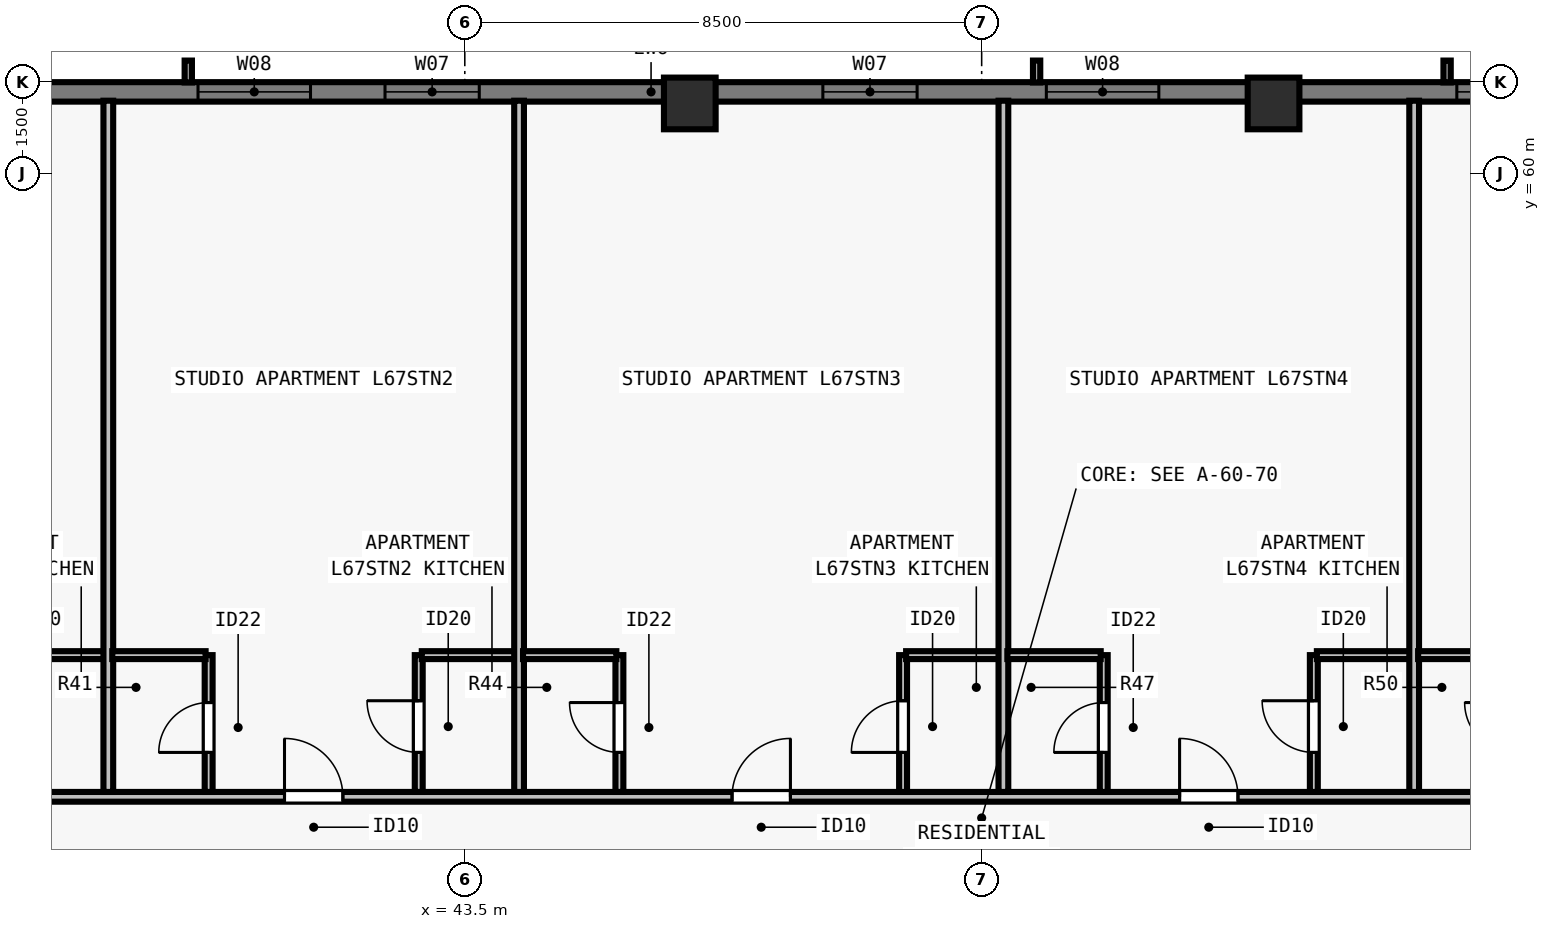
"""IFC4 building model, lengths in metres.
Left out: names, types, materials, properties, quantities, classifications, styles, units other than length and angle.
Written with IfcOpenShell. Run it as: python <this file> out.ifc"""

import sys

from ifc_helpers import new_model, si_unit, direction, frame, frame_2d, origin, origin_2d, place, context, subcontext, project, spatial, rectangle, extrude, element, fill, save


model = new_model("IFC4")
c1 = context("Model", 3, precision=1e-05, world=origin(), true_north=direction((0.0, 1.0)))
c2 = subcontext(c1, "Body", "Model", "MODEL_VIEW")
j1 = project(units=[si_unit("LENGTHUNIT", "METRE"), si_unit("PLANEANGLEUNIT", "RADIAN")], contexts=[c1])
p1 = place(None, origin())
s1 = spatial("IfcSite", under=j1, at=p1, CompositionType="ELEMENT")
p2 = place(p1, origin())
s2 = spatial("IfcBuilding", under=s1, at=p2, CompositionType="ELEMENT")
p3 = place(p2, frame((0.0, 0.0, 244.5)))
s3 = spatial("IfcBuildingStorey", under=s2, at=p3, CompositionType="ELEMENT", Elevation=244.5)
for number, where, z_axis, x_axis in (
    (1, (56.8, 61.15, 0.0), (0.0, 0.0, 1.0), (1.0, 0.0, 0.0)),
    (2, (47.2, 61.15, 0.0), (0.0, 0.0, 1.0), (1.0, 0.0, 0.0)),
):
    element("IfcColumn", number, at=place(p3, frame(where, z_axis=z_axis, x_axis=x_axis)), inside=s3, PredefinedType="COLUMN", context=c2, shape_type="SweptSolid", body=[
        extrude(rectangle(XDim=0.85, YDim=0.85, at=origin_2d()), origin(), (0.0, 0.0, 1.0), 3.5),
    ])
p4 = place(p3, frame((34.5, 61.34, 0.0), z_axis=(0.0, 0.0, 1.0), x_axis=(1.0, 0.0, 0.0)))
e3 = element("IfcWall", 3, at=p4, inside=s3, PredefinedType="SOLIDWALL", context=c2, shape_type="SweptSolid", body=[
    extrude(rectangle(XDim=34.702, YDim=0.32, at=frame_2d((17.351, 0.0))), origin(), (0.0, 0.0, 1.0), 3.29),
])
p5 = place(p4, frame((4.613, 0.0, 0.8)))
e4 = element("IfcOpeningElement", 4, at=p5, cuts=e3, PredefinedType="OPENING", context=c2, shape_type="SweptSolid", body=[
    extrude(rectangle(XDim=1.85, YDim=1.678, at=frame_2d((0.925, 0.839))), frame((0.0, 0.17, 0.0), z_axis=(0.0, -1.0, 0.0), x_axis=(1.0, 0.0, 0.0)), (0.0, 0.0, 1.0), 0.34),
])
p6 = place(p4, frame((7.688, 0.0, 0.8)))
e5 = element("IfcOpeningElement", 5, at=p6, cuts=e3, PredefinedType="OPENING", context=c2, shape_type="SweptSolid", body=[
    extrude(rectangle(XDim=1.55, YDim=1.678, at=frame_2d((0.775, 0.839))), frame((0.0, 0.17, 0.0), z_axis=(0.0, -1.0, 0.0), x_axis=(1.0, 0.0, 0.0)), (0.0, 0.0, 1.0), 0.34),
])
p7 = place(p4, frame((14.888, 0.0, 0.8)))
e6 = element("IfcOpeningElement", 6, at=p7, cuts=e3, PredefinedType="OPENING", context=c2, shape_type="SweptSolid", body=[
    extrude(rectangle(XDim=1.55, YDim=1.678, at=frame_2d((0.775, 0.839))), frame((0.0, 0.17, 0.0), z_axis=(0.0, -1.0, 0.0), x_axis=(1.0, 0.0, 0.0)), (0.0, 0.0, 1.0), 0.34),
])
p8 = place(p4, frame((18.564, 0.0, 0.8)))
e7 = element("IfcOpeningElement", 7, at=p8, cuts=e3, PredefinedType="OPENING", context=c2, shape_type="SweptSolid", body=[
    extrude(rectangle(XDim=1.85, YDim=1.678, at=frame_2d((0.925, 0.839))), frame((0.0, 0.17, 0.0), z_axis=(0.0, -1.0, 0.0), x_axis=(1.0, 0.0, 0.0)), (0.0, 0.0, 1.0), 0.34),
])
p9 = place(p4, frame((25.314, 0.0, 0.8)))
e8 = element("IfcOpeningElement", 8, at=p9, cuts=e3, PredefinedType="OPENING", context=c2, shape_type="SweptSolid", body=[
    extrude(rectangle(XDim=1.85, YDim=1.678, at=frame_2d((0.925, 0.839))), frame((0.0, 0.17, 0.0), z_axis=(0.0, -1.0, 0.0), x_axis=(1.0, 0.0, 0.0)), (0.0, 0.0, 1.0), 0.34),
])
p10 = place(p4, frame((28.389, 0.0, 0.8)))
e9 = element("IfcOpeningElement", 9, at=p10, cuts=e3, PredefinedType="OPENING", context=c2, shape_type="SweptSolid", body=[
    extrude(rectangle(XDim=1.55, YDim=1.678, at=frame_2d((0.775, 0.839))), frame((0.0, 0.17, 0.0), z_axis=(0.0, -1.0, 0.0), x_axis=(1.0, 0.0, 0.0)), (0.0, 0.0, 1.0), 0.34),
])
p11 = place(p3, frame((29.805, 49.748, 0.0), z_axis=(0.0, 0.0, 1.0), x_axis=(1.0, 0.0, 0.0)))
e10 = element("IfcWall", 10, at=p11, inside=s3, PredefinedType="PARTITIONING", context=c2, shape_type="SweptSolid", body=[
    extrude(rectangle(XDim=44.39, YDim=0.16, at=frame_2d((22.195, 0.0))), origin(), (0.0, 0.0, 1.0), 2.958),
])
p12 = place(p11, frame((3.494, 0.0, 0.0)))
e11 = element("IfcOpeningElement", 11, at=p12, cuts=e10, PredefinedType="OPENING", context=c2, shape_type="SweptSolid", body=[
    extrude(rectangle(XDim=0.96, YDim=2.18, at=frame_2d((0.48, 1.09))), frame((0.0, 0.09, 0.0), z_axis=(0.0, -1.0, 0.0), x_axis=(1.0, 0.0, 0.0)), (0.0, 0.0, 1.0), 0.18),
])
p13 = place(p11, frame((10.73, 0.0, 0.0)))
e12 = element("IfcOpeningElement", 12, at=p13, cuts=e10, PredefinedType="OPENING", context=c2, shape_type="SweptSolid", body=[
    extrude(rectangle(XDim=0.96, YDim=2.18, at=frame_2d((0.48, 1.09))), frame((0.0, 0.09, 0.0), z_axis=(0.0, -1.0, 0.0), x_axis=(1.0, 0.0, 0.0)), (0.0, 0.0, 1.0), 0.18),
])
p14 = place(p11, frame((18.09, 0.0, 0.0)))
e13 = element("IfcOpeningElement", 13, at=p14, cuts=e10, PredefinedType="OPENING", context=c2, shape_type="SweptSolid", body=[
    extrude(rectangle(XDim=0.96, YDim=2.18, at=frame_2d((0.48, 1.09))), frame((0.0, 0.09, 0.0), z_axis=(0.0, -1.0, 0.0), x_axis=(1.0, 0.0, 0.0)), (0.0, 0.0, 1.0), 0.18),
])
p15 = place(p11, frame((25.45, 0.0, 0.0)))
e14 = element("IfcOpeningElement", 14, at=p15, cuts=e10, PredefinedType="OPENING", context=c2, shape_type="SweptSolid", body=[
    extrude(rectangle(XDim=0.96, YDim=2.18, at=frame_2d((0.48, 1.09))), frame((0.0, 0.09, 0.0), z_axis=(0.0, -1.0, 0.0), x_axis=(1.0, 0.0, 0.0)), (0.0, 0.0, 1.0), 0.18),
])
p16 = place(p11, frame((32.81, 0.0, 0.0)))
e15 = element("IfcOpeningElement", 15, at=p16, cuts=e10, PredefinedType="OPENING", context=c2, shape_type="SweptSolid", body=[
    extrude(rectangle(XDim=0.96, YDim=2.18, at=frame_2d((0.48, 1.09))), frame((0.0, 0.09, 0.0), z_axis=(0.0, -1.0, 0.0), x_axis=(1.0, 0.0, 0.0)), (0.0, 0.0, 1.0), 0.18),
])
p17 = place(p11, frame((40.294, 0.0, 0.0)))
e16 = element("IfcOpeningElement", 16, at=p17, cuts=e10, PredefinedType="OPENING", context=c2, shape_type="SweptSolid", body=[
    extrude(rectangle(XDim=0.96, YDim=2.18, at=frame_2d((0.48, 1.09))), frame((0.0, 0.09, 0.0), z_axis=(0.0, -1.0, 0.0), x_axis=(1.0, 0.0, 0.0)), (0.0, 0.0, 1.0), 0.18),
])
p18 = place(p3, frame((36.038, 52.077, 0.0), z_axis=(0.0, 0.0, 1.0), x_axis=(1.0, 0.0, 0.0)))
e17 = element("IfcWall", 17, at=p18, inside=s3, PredefinedType="PLUMBINGWALL", context=c2, shape_type="SweptSolid", body=[
    extrude(rectangle(XDim=1.6, YDim=0.13, at=frame_2d((0.8, 0.0))), origin(), (0.0, 0.0, 1.0), 2.958),
])
p19 = place(p3, frame((37.637, 49.827, 0.0), z_axis=(0.0, 0.0, 1.0), x_axis=(0.0, 1.0, 0.0)))
e18 = element("IfcWall", 18, at=p19, inside=s3, PredefinedType="PARTITIONING", context=c2, shape_type="SweptSolid", body=[
    extrude(rectangle(XDim=11.368, YDim=0.16, at=frame_2d((5.684, 0.0))), origin(), (0.0, 0.0, 1.0), 2.573),
])
p20 = place(p3, frame((39.288, 49.827, 0.0), z_axis=(0.0, 0.0, 1.0), x_axis=(0.0, 1.0, 0.0)))
e19 = element("IfcWall", 19, at=p20, inside=s3, PredefinedType="PLUMBINGWALL", context=c2, shape_type="SweptSolid", body=[
    extrude(rectangle(XDim=2.25, YDim=0.13, at=frame_2d((1.125, 0.0))), origin(), (0.0, 0.0, 1.0), 3.29),
])
p21 = place(p20, frame((0.65, 0.0, 0.0)))
e20 = element("IfcOpeningElement", 20, at=p21, cuts=e19, PredefinedType="OPENING", context=c2, shape_type="SweptSolid", body=[
    extrude(rectangle(XDim=0.82, YDim=2.1, at=frame_2d((0.41, 1.05))), frame((0.0, 0.075, 0.0), z_axis=(0.0, -1.0, 0.0), x_axis=(1.0, 0.0, 0.0)), (0.0, 0.0, 1.0), 0.15),
])
p22 = place(p3, frame((37.702, 52.077, 0.0), z_axis=(0.0, 0.0, 1.0), x_axis=(1.0, 0.0, 0.0)))
e21 = element("IfcWall", 21, at=p22, inside=s3, PredefinedType="PLUMBINGWALL", context=c2, shape_type="SweptSolid", body=[
    extrude(rectangle(XDim=1.535, YDim=0.13, at=frame_2d((0.768, 0.0))), origin(), (0.0, 0.0, 1.0), 3.29),
])
p23 = place(p3, frame((42.742, 49.827, 0.0), z_axis=(0.0, 0.0, 1.0), x_axis=(0.0, 1.0, 0.0)))
e22 = element("IfcWall", 22, at=p23, inside=s3, PredefinedType="PLUMBINGWALL", context=c2, shape_type="SweptSolid", body=[
    extrude(rectangle(XDim=2.25, YDim=0.13, at=frame_2d((1.125, 0.0))), origin(), (0.0, 0.0, 1.0), 3.29),
])
p24 = place(p23, frame((0.65, 0.0, 0.0)))
e23 = element("IfcOpeningElement", 23, at=p24, cuts=e22, PredefinedType="OPENING", context=c2, shape_type="SweptSolid", body=[
    extrude(rectangle(XDim=0.85, YDim=2.1, at=frame_2d((0.425, 1.05))), frame((0.0, 0.075, 0.0), z_axis=(0.0, -1.0, 0.0), x_axis=(1.0, 0.0, 0.0)), (0.0, 0.0, 1.0), 0.15),
])
p25 = place(p3, frame((42.792, 52.077, 0.0), z_axis=(0.0, 0.0, 1.0), x_axis=(1.0, 0.0, 0.0)))
e24 = element("IfcWall", 24, at=p25, inside=s3, PredefinedType="PLUMBINGWALL", context=c2, shape_type="SweptSolid", body=[
    extrude(rectangle(XDim=1.6, YDim=0.13, at=frame_2d((0.8, 0.0))), origin(), (0.0, 0.0, 1.0), 3.29),
])
p26 = place(p3, frame((44.393, 49.827, 0.0), z_axis=(0.0, 0.0, 1.0), x_axis=(0.0, 1.0, 0.0)))
e25 = element("IfcWall", 25, at=p26, inside=s3, PredefinedType="PARTITIONING", context=c2, shape_type="SweptSolid", body=[
    extrude(rectangle(XDim=11.368, YDim=0.16, at=frame_2d((5.684, 0.0))), origin(), (0.0, 0.0, 1.0), 3.29),
])
p27 = place(p3, frame((46.042, 49.827, 0.0), z_axis=(0.0, 0.0, 1.0), x_axis=(0.0, 1.0, 0.0)))
e26 = element("IfcWall", 26, at=p27, inside=s3, PredefinedType="PLUMBINGWALL", context=c2, shape_type="SweptSolid", body=[
    extrude(rectangle(XDim=2.25, YDim=0.13, at=frame_2d((1.125, 0.0))), origin(), (0.0, 0.0, 1.0), 3.29),
])
p28 = place(p27, frame((0.65, 0.0, 0.0)))
e27 = element("IfcOpeningElement", 27, at=p28, cuts=e26, PredefinedType="OPENING", context=c2, shape_type="SweptSolid", body=[
    extrude(rectangle(XDim=0.82, YDim=2.1, at=frame_2d((0.41, 1.05))), frame((0.0, 0.075, 0.0), z_axis=(0.0, -1.0, 0.0), x_axis=(1.0, 0.0, 0.0)), (0.0, 0.0, 1.0), 0.15),
])
p29 = place(p3, frame((44.458, 52.077, 0.0), z_axis=(0.0, 0.0, 1.0), x_axis=(1.0, 0.0, 0.0)))
e28 = element("IfcWall", 28, at=p29, inside=s3, PredefinedType="PLUMBINGWALL", context=c2, shape_type="SweptSolid", body=[
    extrude(rectangle(XDim=1.535, YDim=0.13, at=frame_2d((0.768, 0.0))), origin(), (0.0, 0.0, 1.0), 3.29),
])
p30 = place(p3, frame((50.708, 49.827, 0.0), z_axis=(0.0, 0.0, 1.0), x_axis=(0.0, 1.0, 0.0)))
e29 = element("IfcWall", 29, at=p30, inside=s3, PredefinedType="PLUMBINGWALL", context=c2, shape_type="SweptSolid", body=[
    extrude(rectangle(XDim=2.25, YDim=0.13, at=frame_2d((1.125, 0.0))), origin(), (0.0, 0.0, 1.0), 3.29),
])
p31 = place(p30, frame((0.65, 0.0, 0.0)))
e30 = element("IfcOpeningElement", 30, at=p31, cuts=e29, PredefinedType="OPENING", context=c2, shape_type="SweptSolid", body=[
    extrude(rectangle(XDim=0.85, YDim=2.1, at=frame_2d((0.425, 1.05))), frame((0.0, 0.075, 0.0), z_axis=(0.0, -1.0, 0.0), x_axis=(1.0, 0.0, 0.0)), (0.0, 0.0, 1.0), 0.15),
])
p32 = place(p3, frame((50.758, 52.077, 0.0), z_axis=(0.0, 0.0, 1.0), x_axis=(1.0, 0.0, 0.0)))
e31 = element("IfcWall", 31, at=p32, inside=s3, PredefinedType="PLUMBINGWALL", context=c2, shape_type="SweptSolid", body=[
    extrude(rectangle(XDim=1.6, YDim=0.13, at=frame_2d((0.8, 0.0))), origin(), (0.0, 0.0, 1.0), 3.29),
])
p33 = place(p3, frame((52.357, 49.827, 0.0), z_axis=(0.0, 0.0, 1.0), x_axis=(0.0, 1.0, 0.0)))
e32 = element("IfcWall", 32, at=p33, inside=s3, PredefinedType="PARTITIONING", context=c2, shape_type="SweptSolid", body=[
    extrude(rectangle(XDim=11.368, YDim=0.16, at=frame_2d((5.684, 0.0))), origin(), (0.0, 0.0, 1.0), 2.958),
])
p34 = place(p3, frame((54.008, 49.827, 0.0), z_axis=(0.0, 0.0, 1.0), x_axis=(0.0, 1.0, 0.0)))
e33 = element("IfcWall", 33, at=p34, inside=s3, PredefinedType="PLUMBINGWALL", context=c2, shape_type="SweptSolid", body=[
    extrude(rectangle(XDim=2.25, YDim=0.13, at=frame_2d((1.125, 0.0))), origin(), (0.0, 0.0, 1.0), 3.29),
])
p35 = place(p34, frame((0.65, 0.0, 0.0)))
e34 = element("IfcOpeningElement", 34, at=p35, cuts=e33, PredefinedType="OPENING", context=c2, shape_type="SweptSolid", body=[
    extrude(rectangle(XDim=0.82, YDim=2.1, at=frame_2d((0.41, 1.05))), frame((0.0, 0.075, 0.0), z_axis=(0.0, -1.0, 0.0), x_axis=(1.0, 0.0, 0.0)), (0.0, 0.0, 1.0), 0.15),
])
p36 = place(p3, frame((52.423, 52.077, 0.0), z_axis=(0.0, 0.0, 1.0), x_axis=(1.0, 0.0, 0.0)))
e35 = element("IfcWall", 35, at=p36, inside=s3, PredefinedType="PLUMBINGWALL", context=c2, shape_type="SweptSolid", body=[
    extrude(rectangle(XDim=1.535, YDim=0.13, at=frame_2d((0.768, 0.0))), origin(), (0.0, 0.0, 1.0), 3.29),
])
p37 = place(p3, frame((57.462, 49.827, 0.0), z_axis=(0.0, 0.0, 1.0), x_axis=(0.0, 1.0, 0.0)))
e36 = element("IfcWall", 36, at=p37, inside=s3, PredefinedType="PLUMBINGWALL", context=c2, shape_type="SweptSolid", body=[
    extrude(rectangle(XDim=2.25, YDim=0.13, at=frame_2d((1.125, 0.0))), origin(), (0.0, 0.0, 1.0), 3.29),
])
p38 = place(p37, frame((0.65, 0.0, 0.0)))
e37 = element("IfcOpeningElement", 37, at=p38, cuts=e36, PredefinedType="OPENING", context=c2, shape_type="SweptSolid", body=[
    extrude(rectangle(XDim=0.85, YDim=2.1, at=frame_2d((0.425, 1.05))), frame((0.0, 0.075, 0.0), z_axis=(0.0, -1.0, 0.0), x_axis=(1.0, 0.0, 0.0)), (0.0, 0.0, 1.0), 0.15),
])
p39 = place(p3, frame((57.512, 52.077, 0.0), z_axis=(0.0, 0.0, 1.0), x_axis=(1.0, 0.0, 0.0)))
e38 = element("IfcWall", 38, at=p39, inside=s3, PredefinedType="PLUMBINGWALL", context=c2, shape_type="SweptSolid", body=[
    extrude(rectangle(XDim=1.6, YDim=0.13, at=frame_2d((0.8, 0.0))), origin(), (0.0, 0.0, 1.0), 3.29),
])
p40 = place(p3, frame((59.113, 49.827, 0.0), z_axis=(0.0, 0.0, 1.0), x_axis=(0.0, 1.0, 0.0)))
e39 = element("IfcWall", 39, at=p40, inside=s3, PredefinedType="PARTITIONING", context=c2, shape_type="SweptSolid", body=[
    extrude(rectangle(XDim=11.368, YDim=0.16, at=frame_2d((5.684, 0.0))), origin(), (0.0, 0.0, 1.0), 3.29),
])
p41 = place(p3, frame((59.177, 52.077, 0.0), z_axis=(0.0, 0.0, 1.0), x_axis=(1.0, 0.0, 0.0)))
e40 = element("IfcWall", 40, at=p41, inside=s3, PredefinedType="PLUMBINGWALL", context=c2, shape_type="SweptSolid", body=[
    extrude(rectangle(XDim=1.535, YDim=0.13, at=frame_2d((0.768, 0.0))), origin(), (0.0, 0.0, 1.0), 3.29),
])
p42 = place(p5, origin())
e41 = element("IfcWindow", 41, at=p42, inside=s3, PartitioningType="SINGLE_PANEL", PredefinedType="WINDOW", context=c2, shape_type="SweptSolid", body=[
    extrude(rectangle(XDim=1.85, YDim=1.678, at=frame_2d((0.925, 0.839))), frame((0.0, -0.05, 0.0), z_axis=(0.0, -1.0, 0.0), x_axis=(1.0, 0.0, 0.0)), (0.0, 0.0, 1.0), 0.06),
])
fill(e4, e41)
p43 = place(p6, origin())
e42 = element("IfcWindow", 42, at=p43, inside=s3, PartitioningType="SINGLE_PANEL", PredefinedType="WINDOW", context=c2, shape_type="SweptSolid", body=[
    extrude(rectangle(XDim=1.55, YDim=1.678, at=frame_2d((0.775, 0.839))), frame((0.0, -0.05, 0.0), z_axis=(0.0, -1.0, 0.0), x_axis=(1.0, 0.0, 0.0)), (0.0, 0.0, 1.0), 0.06),
])
fill(e5, e42)
p44 = place(p7, origin())
e43 = element("IfcWindow", 43, at=p44, inside=s3, PartitioningType="SINGLE_PANEL", PredefinedType="WINDOW", context=c2, shape_type="SweptSolid", body=[
    extrude(rectangle(XDim=1.55, YDim=1.678, at=frame_2d((0.775, 0.839))), frame((0.0, -0.05, 0.0), z_axis=(0.0, -1.0, 0.0), x_axis=(1.0, 0.0, 0.0)), (0.0, 0.0, 1.0), 0.06),
])
fill(e6, e43)
p45 = place(p8, origin())
e44 = element("IfcWindow", 44, at=p45, inside=s3, PartitioningType="SINGLE_PANEL", PredefinedType="WINDOW", context=c2, shape_type="SweptSolid", body=[
    extrude(rectangle(XDim=1.85, YDim=1.678, at=frame_2d((0.925, 0.839))), frame((0.0, -0.05, 0.0), z_axis=(0.0, -1.0, 0.0), x_axis=(1.0, 0.0, 0.0)), (0.0, 0.0, 1.0), 0.06),
])
fill(e7, e44)
p46 = place(p9, origin())
e45 = element("IfcWindow", 45, at=p46, inside=s3, PartitioningType="SINGLE_PANEL", PredefinedType="WINDOW", context=c2, shape_type="SweptSolid", body=[
    extrude(rectangle(XDim=1.85, YDim=1.678, at=frame_2d((0.925, 0.839))), frame((0.0, -0.05, 0.0), z_axis=(0.0, -1.0, 0.0), x_axis=(1.0, 0.0, 0.0)), (0.0, 0.0, 1.0), 0.06),
])
fill(e8, e45)
p47 = place(p21, origin())
e46 = element("IfcDoor", 46, at=p47, inside=s3, OperationType="SINGLE_SWING_LEFT", PredefinedType="DOOR", context=c2, shape_type="SweptSolid", body=[
    extrude(rectangle(XDim=0.82, YDim=2.1, at=frame_2d((0.41, 1.05))), frame((0.0, 0.025, 0.0), z_axis=(0.0, -1.0, 0.0), x_axis=(1.0, 0.0, 0.0)), (0.0, 0.0, 1.0), 0.05),
])
fill(e20, e46)
p48 = place(p24, origin())
e47 = element("IfcDoor", 47, at=p48, inside=s3, OperationType="SINGLE_SWING_RIGHT", PredefinedType="DOOR", context=c2, shape_type="SweptSolid", body=[
    extrude(rectangle(XDim=0.85, YDim=2.1, at=frame_2d((0.425, 1.05))), frame((0.0, 0.025, 0.0), z_axis=(0.0, -1.0, 0.0), x_axis=(1.0, 0.0, 0.0)), (0.0, 0.0, 1.0), 0.05),
])
fill(e23, e47)
p49 = place(p13, origin())
e48 = element("IfcDoor", 48, at=p49, inside=s3, OperationType="SINGLE_SWING_LEFT", PredefinedType="DOOR", context=c2, shape_type="SweptSolid", body=[
    extrude(rectangle(XDim=0.96, YDim=2.18, at=frame_2d((0.48, 1.09))), frame((0.0, 0.025, 0.0), z_axis=(0.0, -1.0, 0.0), x_axis=(1.0, 0.0, 0.0)), (0.0, 0.0, 1.0), 0.05),
])
fill(e12, e48)
p50 = place(p28, origin())
e49 = element("IfcDoor", 49, at=p50, inside=s3, OperationType="SINGLE_SWING_RIGHT", PredefinedType="DOOR", context=c2, shape_type="SweptSolid", body=[
    extrude(rectangle(XDim=0.82, YDim=2.1, at=frame_2d((0.41, 1.05))), frame((0.0, 0.025, 0.0), z_axis=(0.0, -1.0, 0.0), x_axis=(1.0, 0.0, 0.0)), (0.0, 0.0, 1.0), 0.05),
])
fill(e27, e49)
p51 = place(p31, origin())
e50 = element("IfcDoor", 50, at=p51, inside=s3, OperationType="SINGLE_SWING_LEFT", PredefinedType="DOOR", context=c2, shape_type="SweptSolid", body=[
    extrude(rectangle(XDim=0.85, YDim=2.1, at=frame_2d((0.425, 1.05))), frame((0.0, 0.025, 0.0), z_axis=(0.0, -1.0, 0.0), x_axis=(1.0, 0.0, 0.0)), (0.0, 0.0, 1.0), 0.05),
])
fill(e30, e50)
p52 = place(p14, origin())
e51 = element("IfcDoor", 51, at=p52, inside=s3, OperationType="SINGLE_SWING_RIGHT", PredefinedType="DOOR", context=c2, shape_type="SweptSolid", body=[
    extrude(rectangle(XDim=0.96, YDim=2.18, at=frame_2d((0.48, 1.09))), frame((0.0, 0.025, 0.0), z_axis=(0.0, -1.0, 0.0), x_axis=(1.0, 0.0, 0.0)), (0.0, 0.0, 1.0), 0.05),
])
fill(e13, e51)
p53 = place(p35, origin())
e52 = element("IfcDoor", 52, at=p53, inside=s3, OperationType="SINGLE_SWING_LEFT", PredefinedType="DOOR", context=c2, shape_type="SweptSolid", body=[
    extrude(rectangle(XDim=0.82, YDim=2.1, at=frame_2d((0.41, 1.05))), frame((0.0, 0.025, 0.0), z_axis=(0.0, -1.0, 0.0), x_axis=(1.0, 0.0, 0.0)), (0.0, 0.0, 1.0), 0.05),
])
fill(e34, e52)
p54 = place(p38, origin())
e53 = element("IfcDoor", 53, at=p54, inside=s3, OperationType="SINGLE_SWING_RIGHT", PredefinedType="DOOR", context=c2, shape_type="SweptSolid", body=[
    extrude(rectangle(XDim=0.85, YDim=2.1, at=frame_2d((0.425, 1.05))), frame((0.0, 0.025, 0.0), z_axis=(0.0, -1.0, 0.0), x_axis=(1.0, 0.0, 0.0)), (0.0, 0.0, 1.0), 0.05),
])
fill(e37, e53)
p55 = place(p15, origin())
e54 = element("IfcDoor", 54, at=p55, inside=s3, OperationType="SINGLE_SWING_LEFT", PredefinedType="DOOR", context=c2, shape_type="SweptSolid", body=[
    extrude(rectangle(XDim=0.96, YDim=2.18, at=frame_2d((0.48, 1.09))), frame((0.0, 0.025, 0.0), z_axis=(0.0, -1.0, 0.0), x_axis=(1.0, 0.0, 0.0)), (0.0, 0.0, 1.0), 0.05),
])
fill(e14, e54)
save(model, sys.argv[1])
